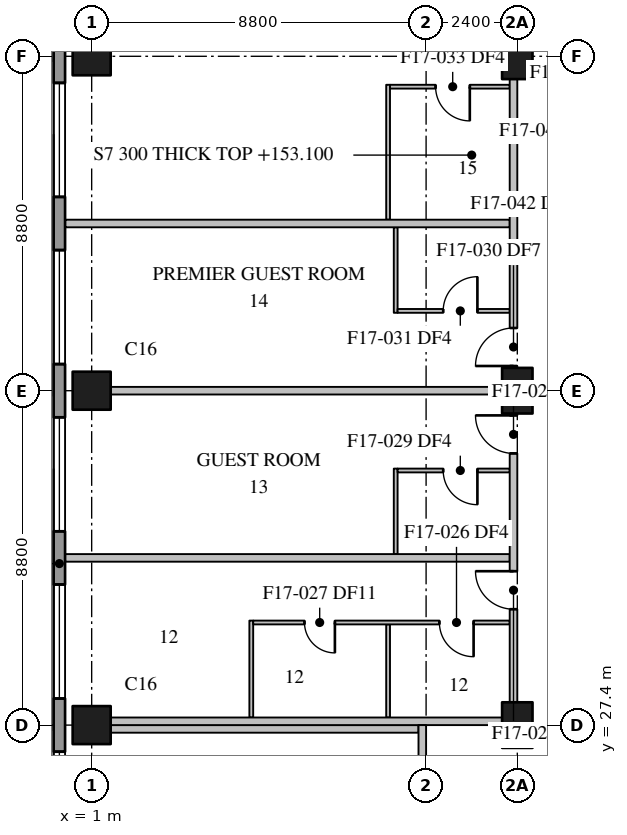
"""IFC4 building model, lengths in metres.
Left out: names, types, materials, properties, quantities, classifications, styles, units other than length and angle.
Written with IfcOpenShell. Run it as: python <this file> out.ifc"""

import sys

from ifc_helpers import new_model, si_unit, direction, frame, frame_2d, origin, origin_2d, place, context, subcontext, project, spatial, rectangle, extrude, element, fill, save


model = new_model("IFC4")
c1 = context("Model", 3, precision=1e-05, world=origin(), true_north=direction((0.0, 1.0)))
c2 = subcontext(c1, "Body", "Model", "MODEL_VIEW")
j1 = project(units=[si_unit("LENGTHUNIT", "METRE"), si_unit("PLANEANGLEUNIT", "RADIAN")], contexts=[c1])
p1 = place(None, origin())
s1 = spatial("IfcSite", under=j1, at=p1, CompositionType="ELEMENT")
p2 = place(p1, origin())
s2 = spatial("IfcBuilding", under=s1, at=p2, CompositionType="ELEMENT")
p3 = place(p2, frame((0.0, 0.0, 153.1)))
s3 = spatial("IfcBuildingStorey", under=s2, at=p3, CompositionType="ELEMENT", Elevation=153.1)
for number, where, z_axis, x_axis in (
    (1, (1.0, 27.4, 0.0), (0.0, 0.0, 1.0), (1.0, 0.0, 0.0)),
    (2, (1.0, 36.2, 0.0), (0.0, 0.0, 1.0), (1.0, 0.0, 0.0)),
    (3, (1.0, 45.0, 0.0), (0.0, 0.0, 1.0), (1.0, 0.0, 0.0)),
):
    element("IfcColumn", number, at=place(p3, frame(where, z_axis=z_axis, x_axis=x_axis)), inside=s3, PredefinedType="COLUMN", context=c2, shape_type="SweptSolid", body=[
        extrude(rectangle(XDim=1.0, YDim=1.0, at=origin_2d()), origin(), (0.0, 0.0, 1.0), 3.7),
    ])
for number, where, z_axis, x_axis in (
    (4, (12.2, 27.4, 0.0), (0.0, 0.0, 1.0), (0.0, 1.0, 0.0)),
    (5, (12.2, 36.2, 0.0), (0.0, 0.0, 1.0), (0.0, 1.0, 0.0)),
    (6, (12.2, 45.0, 0.0), (0.0, 0.0, 1.0), (0.0, 1.0, 0.0)),
):
    element("IfcColumn", number, at=place(p3, frame(where, z_axis=z_axis, x_axis=x_axis)), inside=s3, PredefinedType="COLUMN", context=c2, shape_type="SweptSolid", body=[
        extrude(rectangle(XDim=1.2, YDim=0.8, at=origin_2d()), origin(), (0.0, 0.0, 1.0), 3.7),
    ])
p4 = place(p3, frame((0.15, 61.1, 0.0), z_axis=(0.0, 0.0, 1.0), x_axis=(0.0, -1.0, 0.0)))
e7 = element("IfcWall", 7, at=p4, inside=s3, PredefinedType="STANDARD", context=c2, shape_type="SweptSolid", body=[
    extrude(rectangle(XDim=58.9, YDim=0.3, at=frame_2d((29.45, 0.0))), origin(), (0.0, 0.0, 1.0), 3.4),
])
p5 = place(p4, frame((3.6, 0.0, 0.75)))
e8 = element("IfcOpeningElement", 8, at=p5, cuts=e7, PredefinedType="OPENING", context=c2, shape_type="SweptSolid", body=[
    extrude(rectangle(XDim=3.0, YDim=2.3, at=frame_2d((1.5, 1.15))), frame((0.0, 0.16, 0.0), z_axis=(0.0, -1.0, 0.0), x_axis=(1.0, 0.0, 0.0)), (0.0, 0.0, 1.0), 0.32),
])
p6 = place(p4, frame((8.0, 0.0, 0.75)))
e9 = element("IfcOpeningElement", 9, at=p6, cuts=e7, PredefinedType="OPENING", context=c2, shape_type="SweptSolid", body=[
    extrude(rectangle(XDim=3.0, YDim=2.3, at=frame_2d((1.5, 1.15))), frame((0.0, 0.16, 0.0), z_axis=(0.0, -1.0, 0.0), x_axis=(1.0, 0.0, 0.0)), (0.0, 0.0, 1.0), 0.32),
])
p7 = place(p4, frame((12.4, 0.0, 0.75)))
e10 = element("IfcOpeningElement", 10, at=p7, cuts=e7, PredefinedType="OPENING", context=c2, shape_type="SweptSolid", body=[
    extrude(rectangle(XDim=3.0, YDim=2.3, at=frame_2d((1.5, 1.15))), frame((0.0, 0.16, 0.0), z_axis=(0.0, -1.0, 0.0), x_axis=(1.0, 0.0, 0.0)), (0.0, 0.0, 1.0), 0.32),
])
p8 = place(p4, frame((16.8, 0.0, 0.75)))
e11 = element("IfcOpeningElement", 11, at=p8, cuts=e7, PredefinedType="OPENING", context=c2, shape_type="SweptSolid", body=[
    extrude(rectangle(XDim=3.0, YDim=2.3, at=frame_2d((1.5, 1.15))), frame((0.0, 0.16, 0.0), z_axis=(0.0, -1.0, 0.0), x_axis=(1.0, 0.0, 0.0)), (0.0, 0.0, 1.0), 0.32),
])
p9 = place(p4, frame((21.2, 0.0, 0.75)))
e12 = element("IfcOpeningElement", 12, at=p9, cuts=e7, PredefinedType="OPENING", context=c2, shape_type="SweptSolid", body=[
    extrude(rectangle(XDim=3.0, YDim=2.3, at=frame_2d((1.5, 1.15))), frame((0.0, 0.16, 0.0), z_axis=(0.0, -1.0, 0.0), x_axis=(1.0, 0.0, 0.0)), (0.0, 0.0, 1.0), 0.32),
])
p10 = place(p4, frame((25.6, 0.0, 0.75)))
e13 = element("IfcOpeningElement", 13, at=p10, cuts=e7, PredefinedType="OPENING", context=c2, shape_type="SweptSolid", body=[
    extrude(rectangle(XDim=3.0, YDim=2.3, at=frame_2d((1.5, 1.15))), frame((0.0, 0.16, 0.0), z_axis=(0.0, -1.0, 0.0), x_axis=(1.0, 0.0, 0.0)), (0.0, 0.0, 1.0), 0.32),
])
p11 = place(p4, frame((30.0, 0.0, 0.75)))
e14 = element("IfcOpeningElement", 14, at=p11, cuts=e7, PredefinedType="OPENING", context=c2, shape_type="SweptSolid", body=[
    extrude(rectangle(XDim=3.0, YDim=2.3, at=frame_2d((1.5, 1.15))), frame((0.0, 0.16, 0.0), z_axis=(0.0, -1.0, 0.0), x_axis=(1.0, 0.0, 0.0)), (0.0, 0.0, 1.0), 0.32),
])
p12 = place(p4, frame((34.4, 0.0, 0.75)))
e15 = element("IfcOpeningElement", 15, at=p12, cuts=e7, PredefinedType="OPENING", context=c2, shape_type="SweptSolid", body=[
    extrude(rectangle(XDim=3.0, YDim=2.3, at=frame_2d((1.5, 1.15))), frame((0.0, 0.16, 0.0), z_axis=(0.0, -1.0, 0.0), x_axis=(1.0, 0.0, 0.0)), (0.0, 0.0, 1.0), 0.32),
])
p13 = place(p4, frame((38.8, 0.0, 0.75)))
e16 = element("IfcOpeningElement", 16, at=p13, cuts=e7, PredefinedType="OPENING", context=c2, shape_type="SweptSolid", body=[
    extrude(rectangle(XDim=3.0, YDim=2.3, at=frame_2d((1.5, 1.15))), frame((0.0, 0.16, 0.0), z_axis=(0.0, -1.0, 0.0), x_axis=(1.0, 0.0, 0.0)), (0.0, 0.0, 1.0), 0.32),
])
p14 = place(p4, frame((43.2, 0.0, 0.75)))
e17 = element("IfcOpeningElement", 17, at=p14, cuts=e7, PredefinedType="OPENING", context=c2, shape_type="SweptSolid", body=[
    extrude(rectangle(XDim=3.0, YDim=2.3, at=frame_2d((1.5, 1.15))), frame((0.0, 0.16, 0.0), z_axis=(0.0, -1.0, 0.0), x_axis=(1.0, 0.0, 0.0)), (0.0, 0.0, 1.0), 0.32),
])
p15 = place(p4, frame((47.6, 0.0, 0.75)))
e18 = element("IfcOpeningElement", 18, at=p15, cuts=e7, PredefinedType="OPENING", context=c2, shape_type="SweptSolid", body=[
    extrude(rectangle(XDim=3.0, YDim=2.3, at=frame_2d((1.5, 1.15))), frame((0.0, 0.16, 0.0), z_axis=(0.0, -1.0, 0.0), x_axis=(1.0, 0.0, 0.0)), (0.0, 0.0, 1.0), 0.32),
])
p16 = place(p4, frame((52.0, 0.0, 0.75)))
e19 = element("IfcOpeningElement", 19, at=p16, cuts=e7, PredefinedType="OPENING", context=c2, shape_type="SweptSolid", body=[
    extrude(rectangle(XDim=3.0, YDim=2.3, at=frame_2d((1.5, 1.15))), frame((0.0, 0.16, 0.0), z_axis=(0.0, -1.0, 0.0), x_axis=(1.0, 0.0, 0.0)), (0.0, 0.0, 1.0), 0.32),
])
p17 = place(p3, frame((9.7, 9.8, 0.0), z_axis=(0.0, 0.0, 1.0), x_axis=(0.0, 1.0, 0.0)))
e20 = element("IfcWall", 20, at=p17, inside=s3, PredefinedType="PARTITIONING", context=c2, shape_type="SweptSolid", body=[
    extrude(rectangle(XDim=17.6, YDim=0.2, at=frame_2d((8.8, 0.0))), origin(), (0.0, 0.0, 1.0), 3.4),
])
p18 = place(p17, frame((2.55, 0.0, 0.0)))
e21 = element("IfcOpeningElement", 21, at=p18, cuts=e20, PredefinedType="OPENING", context=c2, shape_type="SweptSolid", body=[
    extrude(rectangle(XDim=1.1, YDim=2.1, at=frame_2d((0.55, 1.05))), frame((0.0, 0.11, 0.0), z_axis=(0.0, -1.0, 0.0), x_axis=(1.0, 0.0, 0.0)), (0.0, 0.0, 1.0), 0.22),
])
p19 = place(p17, frame((12.65, 0.0, 0.0)))
e22 = element("IfcOpeningElement", 22, at=p19, cuts=e20, PredefinedType="OPENING", context=c2, shape_type="SweptSolid", body=[
    extrude(rectangle(XDim=1.1, YDim=2.1, at=frame_2d((0.55, 1.05))), frame((0.0, 0.11, 0.0), z_axis=(0.0, -1.0, 0.0), x_axis=(1.0, 0.0, 0.0)), (0.0, 0.0, 1.0), 0.22),
])
p20 = place(p3, frame((1.5, 27.3, 0.0), z_axis=(0.0, 0.0, 1.0), x_axis=(1.0, 0.0, 0.0)))
e23 = element("IfcWall", 23, at=p20, inside=s3, PredefinedType="PARTITIONING", context=c2, shape_type="SweptSolid", body=[
    extrude(rectangle(XDim=8.1, YDim=0.2, at=frame_2d((4.05, 0.0))), origin(), (0.0, 0.0, 1.0), 3.4),
])
p21 = place(p3, frame((12.1, 28.0, 0.0), z_axis=(0.0, 0.0, 1.0), x_axis=(0.0, 1.0, 0.0)))
e24 = element("IfcWall", 24, at=p21, inside=s3, PredefinedType="PARTITIONING", context=c2, shape_type="SweptSolid", body=[
    extrude(rectangle(XDim=7.6, YDim=0.2, at=frame_2d((3.8, 0.0))), origin(), (0.0, 0.0, 1.0), 3.4),
])
p22 = place(p21, frame((2.45, 0.0, 0.0)))
e25 = element("IfcOpeningElement", 25, at=p22, cuts=e24, PredefinedType="OPENING", context=c2, shape_type="SweptSolid", body=[
    extrude(rectangle(XDim=1.0, YDim=2.1, at=frame_2d((0.5, 1.05))), frame((0.0, 0.11, 0.0), z_axis=(0.0, -1.0, 0.0), x_axis=(1.0, 0.0, 0.0)), (0.0, 0.0, 1.0), 0.22),
])
p23 = place(p21, frame((6.55, 0.0, 0.0)))
e26 = element("IfcOpeningElement", 26, at=p23, cuts=e24, PredefinedType="OPENING", context=c2, shape_type="SweptSolid", body=[
    extrude(rectangle(XDim=1.0, YDim=2.1, at=frame_2d((0.5, 1.05))), frame((0.0, 0.11, 0.0), z_axis=(0.0, -1.0, 0.0), x_axis=(1.0, 0.0, 0.0)), (0.0, 0.0, 1.0), 0.22),
])
p24 = place(p3, frame((12.1, 36.8, 0.0), z_axis=(0.0, 0.0, 1.0), x_axis=(0.0, 1.0, 0.0)))
e27 = element("IfcWall", 27, at=p24, inside=s3, PredefinedType="PARTITIONING", context=c2, shape_type="SweptSolid", body=[
    extrude(rectangle(XDim=7.6, YDim=0.2, at=frame_2d((3.8, 0.0))), origin(), (0.0, 0.0, 1.0), 3.4),
])
p25 = place(p24, frame((0.05, 0.0, 0.0)))
e28 = element("IfcOpeningElement", 28, at=p25, cuts=e27, PredefinedType="OPENING", context=c2, shape_type="SweptSolid", body=[
    extrude(rectangle(XDim=1.0, YDim=2.1, at=frame_2d((0.5, 1.05))), frame((0.0, 0.11, 0.0), z_axis=(0.0, -1.0, 0.0), x_axis=(1.0, 0.0, 0.0)), (0.0, 0.0, 1.0), 0.22),
])
p26 = place(p3, frame((1.5, 27.5, 0.0), z_axis=(0.0, 0.0, 1.0), x_axis=(1.0, 0.0, 0.0)))
e29 = element("IfcWall", 29, at=p26, inside=s3, PredefinedType="PARTITIONING", context=c2, shape_type="SweptSolid", body=[
    extrude(rectangle(XDim=10.3, YDim=0.2, at=frame_2d((5.15, 0.0))), origin(), (0.0, 0.0, 1.0), 3.4),
])
p27 = place(p3, frame((0.31, 31.8, 0.0), z_axis=(0.0, 0.0, 1.0), x_axis=(1.0, 0.0, 0.0)))
e30 = element("IfcWall", 30, at=p27, inside=s3, PredefinedType="PARTITIONING", context=c2, shape_type="SweptSolid", body=[
    extrude(rectangle(XDim=11.69, YDim=0.2, at=frame_2d((5.845, 0.0))), origin(), (0.0, 0.0, 1.0), 3.4),
])
p28 = place(p3, frame((1.5, 36.2, 0.0), z_axis=(0.0, 0.0, 1.0), x_axis=(1.0, 0.0, 0.0)))
e31 = element("IfcWall", 31, at=p28, inside=s3, PredefinedType="PARTITIONING", context=c2, shape_type="SweptSolid", body=[
    extrude(rectangle(XDim=10.3, YDim=0.2, at=frame_2d((5.15, 0.0))), origin(), (0.0, 0.0, 1.0), 3.4),
])
p29 = place(p3, frame((0.31, 40.6, 0.0), z_axis=(0.0, 0.0, 1.0), x_axis=(1.0, 0.0, 0.0)))
e32 = element("IfcWall", 32, at=p29, inside=s3, PredefinedType="PARTITIONING", context=c2, shape_type="SweptSolid", body=[
    extrude(rectangle(XDim=11.69, YDim=0.2, at=frame_2d((5.845, 0.0))), origin(), (0.0, 0.0, 1.0), 3.4),
])
p30 = place(p3, frame((5.2, 27.6, 0.0), z_axis=(0.0, 0.0, 1.0), x_axis=(0.0, 1.0, 0.0)))
e33 = element("IfcWall", 33, at=p30, inside=s3, PredefinedType="PARTITIONING", context=c2, shape_type="SweptSolid", body=[
    extrude(rectangle(XDim=2.55, YDim=0.1, at=frame_2d((1.275, 0.0))), origin(), (0.0, 0.0, 1.0), 3.4),
])
p31 = place(p3, frame((8.8, 27.6, 0.0), z_axis=(0.0, 0.0, 1.0), x_axis=(0.0, 1.0, 0.0)))
e34 = element("IfcWall", 34, at=p31, inside=s3, PredefinedType="PARTITIONING", context=c2, shape_type="SweptSolid", body=[
    extrude(rectangle(XDim=2.45, YDim=0.1, at=frame_2d((1.225, 0.0))), origin(), (0.0, 0.0, 1.0), 3.4),
])
p32 = place(p3, frame((8.8, 40.7, 0.0), z_axis=(0.0, 0.0, 1.0), x_axis=(0.0, 1.0, 0.0)))
e35 = element("IfcWall", 35, at=p32, inside=s3, PredefinedType="PARTITIONING", context=c2, shape_type="SweptSolid", body=[
    extrude(rectangle(XDim=3.55, YDim=0.1, at=frame_2d((1.775, 0.0))), origin(), (0.0, 0.0, 1.0), 3.4),
])
p33 = place(p3, frame((12.0, 30.1, 0.0), z_axis=(0.0, 0.0, 1.0), x_axis=(-1.0, 0.0, 0.0)))
e36 = element("IfcWall", 36, at=p33, inside=s3, PredefinedType="PARTITIONING", context=c2, shape_type="SweptSolid", body=[
    extrude(rectangle(XDim=6.75, YDim=0.1, at=frame_2d((3.375, 0.0))), origin(), (0.0, 0.0, 1.0), 3.4),
])
p34 = place(p33, frame((0.95, 0.0, 0.0)))
e37 = element("IfcOpeningElement", 37, at=p34, cuts=e36, PredefinedType="OPENING", context=c2, shape_type="SweptSolid", body=[
    extrude(rectangle(XDim=0.9, YDim=2.1, at=frame_2d((0.45, 1.05))), frame((0.0, 0.06, 0.0), z_axis=(0.0, -1.0, 0.0), x_axis=(1.0, 0.0, 0.0)), (0.0, 0.0, 1.0), 0.12),
])
p35 = place(p33, frame((4.6, 0.0, 0.0)))
e38 = element("IfcOpeningElement", 38, at=p35, cuts=e36, PredefinedType="OPENING", context=c2, shape_type="SweptSolid", body=[
    extrude(rectangle(XDim=0.8, YDim=2.1, at=frame_2d((0.4, 1.05))), frame((0.0, 0.06, 0.0), z_axis=(0.0, -1.0, 0.0), x_axis=(1.0, 0.0, 0.0)), (0.0, 0.0, 1.0), 0.12),
])
for number, where, z_axis, x_axis in (
    (39, (9.0, 31.9, 0.0), (0.0, 0.0, 1.0), (0.0, 1.0, 0.0)),
    (40, (9.0, 38.25, 0.0), (0.0, 0.0, 1.0), (0.0, 1.0, 0.0)),
):
    element("IfcWall", number, at=place(p3, frame(where, z_axis=z_axis, x_axis=x_axis)), inside=s3, PredefinedType="PARTITIONING", context=c2, shape_type="SweptSolid", body=[
        extrude(rectangle(XDim=2.25, YDim=0.1, at=frame_2d((1.125, 0.0))), origin(), (0.0, 0.0, 1.0), 3.4),
    ])
p36 = place(p3, frame((12.0, 34.1, 0.0), z_axis=(0.0, 0.0, 1.0), x_axis=(-1.0, 0.0, 0.0)))
e41 = element("IfcWall", 41, at=p36, inside=s3, PredefinedType="PARTITIONING", context=c2, shape_type="SweptSolid", body=[
    extrude(rectangle(XDim=2.95, YDim=0.1, at=frame_2d((1.475, 0.0))), origin(), (0.0, 0.0, 1.0), 3.4),
])
p37 = place(p36, frame((0.85, 0.0, 0.0)))
e42 = element("IfcOpeningElement", 42, at=p37, cuts=e41, PredefinedType="OPENING", context=c2, shape_type="SweptSolid", body=[
    extrude(rectangle(XDim=0.9, YDim=2.1, at=frame_2d((0.45, 1.05))), frame((0.0, 0.06, 0.0), z_axis=(0.0, -1.0, 0.0), x_axis=(1.0, 0.0, 0.0)), (0.0, 0.0, 1.0), 0.12),
])
p38 = place(p3, frame((9.05, 38.3, 0.0), z_axis=(0.0, 0.0, 1.0), x_axis=(1.0, 0.0, 0.0)))
e43 = element("IfcWall", 43, at=p38, inside=s3, PredefinedType="PARTITIONING", context=c2, shape_type="SweptSolid", body=[
    extrude(rectangle(XDim=2.95, YDim=0.1, at=frame_2d((1.475, 0.0))), origin(), (0.0, 0.0, 1.0), 3.4),
])
p39 = place(p38, frame((1.2, 0.0, 0.0)))
e44 = element("IfcOpeningElement", 44, at=p39, cuts=e43, PredefinedType="OPENING", context=c2, shape_type="SweptSolid", body=[
    extrude(rectangle(XDim=0.9, YDim=2.1, at=frame_2d((0.45, 1.05))), frame((0.0, 0.06, 0.0), z_axis=(0.0, -1.0, 0.0), x_axis=(1.0, 0.0, 0.0)), (0.0, 0.0, 1.0), 0.12),
])
p40 = place(p3, frame((12.0, 44.2, 0.0), z_axis=(0.0, 0.0, 1.0), x_axis=(-1.0, 0.0, 0.0)))
e45 = element("IfcWall", 45, at=p40, inside=s3, PredefinedType="PARTITIONING", context=c2, shape_type="SweptSolid", body=[
    extrude(rectangle(XDim=3.15, YDim=0.1, at=frame_2d((1.575, 0.0))), origin(), (0.0, 0.0, 1.0), 3.4),
])
p41 = place(p40, frame((1.05, 0.0, 0.0)))
e46 = element("IfcOpeningElement", 46, at=p41, cuts=e45, PredefinedType="OPENING", context=c2, shape_type="SweptSolid", body=[
    extrude(rectangle(XDim=0.9, YDim=2.1, at=frame_2d((0.45, 1.05))), frame((0.0, 0.06, 0.0), z_axis=(0.0, -1.0, 0.0), x_axis=(1.0, 0.0, 0.0)), (0.0, 0.0, 1.0), 0.12),
])
p42 = place(p8, origin())
e47 = element("IfcWindow", 47, at=p42, inside=s3, PartitioningType="SINGLE_PANEL", PredefinedType="WINDOW", context=c2, shape_type="SweptSolid", body=[
    extrude(rectangle(XDim=3.0, YDim=2.3, at=frame_2d((1.5, 1.15))), frame((0.0, 0.03, 0.0), z_axis=(0.0, -1.0, 0.0), x_axis=(1.0, 0.0, 0.0)), (0.0, 0.0, 1.0), 0.06),
])
fill(e11, e47)
p43 = place(p9, origin())
e48 = element("IfcWindow", 48, at=p43, inside=s3, PartitioningType="SINGLE_PANEL", PredefinedType="WINDOW", context=c2, shape_type="SweptSolid", body=[
    extrude(rectangle(XDim=3.0, YDim=2.3, at=frame_2d((1.5, 1.15))), frame((0.0, 0.03, 0.0), z_axis=(0.0, -1.0, 0.0), x_axis=(1.0, 0.0, 0.0)), (0.0, 0.0, 1.0), 0.06),
])
fill(e12, e48)
p44 = place(p10, origin())
e49 = element("IfcWindow", 49, at=p44, inside=s3, PartitioningType="SINGLE_PANEL", PredefinedType="WINDOW", context=c2, shape_type="SweptSolid", body=[
    extrude(rectangle(XDim=3.0, YDim=2.3, at=frame_2d((1.5, 1.15))), frame((0.0, 0.03, 0.0), z_axis=(0.0, -1.0, 0.0), x_axis=(1.0, 0.0, 0.0)), (0.0, 0.0, 1.0), 0.06),
])
fill(e13, e49)
p45 = place(p11, origin())
e50 = element("IfcWindow", 50, at=p45, inside=s3, PartitioningType="SINGLE_PANEL", PredefinedType="WINDOW", context=c2, shape_type="SweptSolid", body=[
    extrude(rectangle(XDim=3.0, YDim=2.3, at=frame_2d((1.5, 1.15))), frame((0.0, 0.03, 0.0), z_axis=(0.0, -1.0, 0.0), x_axis=(1.0, 0.0, 0.0)), (0.0, 0.0, 1.0), 0.06),
])
fill(e14, e50)
p46 = place(p12, origin())
e51 = element("IfcWindow", 51, at=p46, inside=s3, PartitioningType="SINGLE_PANEL", PredefinedType="WINDOW", context=c2, shape_type="SweptSolid", body=[
    extrude(rectangle(XDim=3.0, YDim=2.3, at=frame_2d((1.5, 1.15))), frame((0.0, 0.03, 0.0), z_axis=(0.0, -1.0, 0.0), x_axis=(1.0, 0.0, 0.0)), (0.0, 0.0, 1.0), 0.06),
])
fill(e15, e51)
p47 = place(p22, origin())
e52 = element("IfcDoor", 52, at=p47, inside=s3, OperationType="SINGLE_SWING_RIGHT", PredefinedType="DOOR", context=c2, shape_type="SweptSolid", body=[
    extrude(rectangle(XDim=1.0, YDim=2.1, at=frame_2d((0.5, 1.05))), frame((0.0, 0.025, 0.0), z_axis=(0.0, -1.0, 0.0), x_axis=(1.0, 0.0, 0.0)), (0.0, 0.0, 1.0), 0.05),
])
fill(e25, e52)
p48 = place(p34, origin())
e53 = element("IfcDoor", 53, at=p48, inside=s3, OperationType="SINGLE_SWING_LEFT", PredefinedType="DOOR", context=c2, shape_type="SweptSolid", body=[
    extrude(rectangle(XDim=0.9, YDim=2.1, at=frame_2d((0.45, 1.05))), frame((0.0, 0.025, 0.0), z_axis=(0.0, -1.0, 0.0), x_axis=(1.0, 0.0, 0.0)), (0.0, 0.0, 1.0), 0.05),
])
fill(e37, e53)
p49 = place(p35, origin())
e54 = element("IfcDoor", 54, at=p49, inside=s3, OperationType="SINGLE_SWING_LEFT", PredefinedType="DOOR", context=c2, shape_type="SweptSolid", body=[
    extrude(rectangle(XDim=0.8, YDim=2.1, at=frame_2d((0.4, 1.05))), frame((0.0, 0.025, 0.0), z_axis=(0.0, -1.0, 0.0), x_axis=(1.0, 0.0, 0.0)), (0.0, 0.0, 1.0), 0.05),
])
fill(e38, e54)
p50 = place(p23, origin())
e55 = element("IfcDoor", 55, at=p50, inside=s3, OperationType="SINGLE_SWING_RIGHT", PredefinedType="DOOR", context=c2, shape_type="SweptSolid", body=[
    extrude(rectangle(XDim=1.0, YDim=2.1, at=frame_2d((0.5, 1.05))), frame((0.0, 0.025, 0.0), z_axis=(0.0, -1.0, 0.0), x_axis=(1.0, 0.0, 0.0)), (0.0, 0.0, 1.0), 0.05),
])
fill(e26, e55)
p51 = place(p37, origin())
e56 = element("IfcDoor", 56, at=p51, inside=s3, OperationType="SINGLE_SWING_LEFT", PredefinedType="DOOR", context=c2, shape_type="SweptSolid", body=[
    extrude(rectangle(XDim=0.9, YDim=2.1, at=frame_2d((0.45, 1.05))), frame((0.0, 0.025, 0.0), z_axis=(0.0, -1.0, 0.0), x_axis=(1.0, 0.0, 0.0)), (0.0, 0.0, 1.0), 0.05),
])
fill(e42, e56)
p52 = place(p25, origin())
e57 = element("IfcDoor", 57, at=p52, inside=s3, OperationType="SINGLE_SWING_LEFT", PredefinedType="DOOR", context=c2, shape_type="SweptSolid", body=[
    extrude(rectangle(XDim=1.0, YDim=2.1, at=frame_2d((0.5, 1.05))), frame((0.0, 0.025, 0.0), z_axis=(0.0, -1.0, 0.0), x_axis=(1.0, 0.0, 0.0)), (0.0, 0.0, 1.0), 0.05),
])
fill(e28, e57)
p53 = place(p39, origin())
e58 = element("IfcDoor", 58, at=p53, inside=s3, OperationType="SINGLE_SWING_RIGHT", PredefinedType="DOOR", context=c2, shape_type="SweptSolid", body=[
    extrude(rectangle(XDim=0.9, YDim=2.1, at=frame_2d((0.45, 1.05))), frame((0.0, 0.025, 0.0), z_axis=(0.0, -1.0, 0.0), x_axis=(1.0, 0.0, 0.0)), (0.0, 0.0, 1.0), 0.05),
])
fill(e44, e58)
p54 = place(p41, origin())
e59 = element("IfcDoor", 59, at=p54, inside=s3, OperationType="SINGLE_SWING_LEFT", PredefinedType="DOOR", context=c2, shape_type="SweptSolid", body=[
    extrude(rectangle(XDim=0.9, YDim=2.1, at=frame_2d((0.45, 1.05))), frame((0.0, 0.025, 0.0), z_axis=(0.0, -1.0, 0.0), x_axis=(1.0, 0.0, 0.0)), (0.0, 0.0, 1.0), 0.05),
])
fill(e46, e59)
save(model, sys.argv[1])
